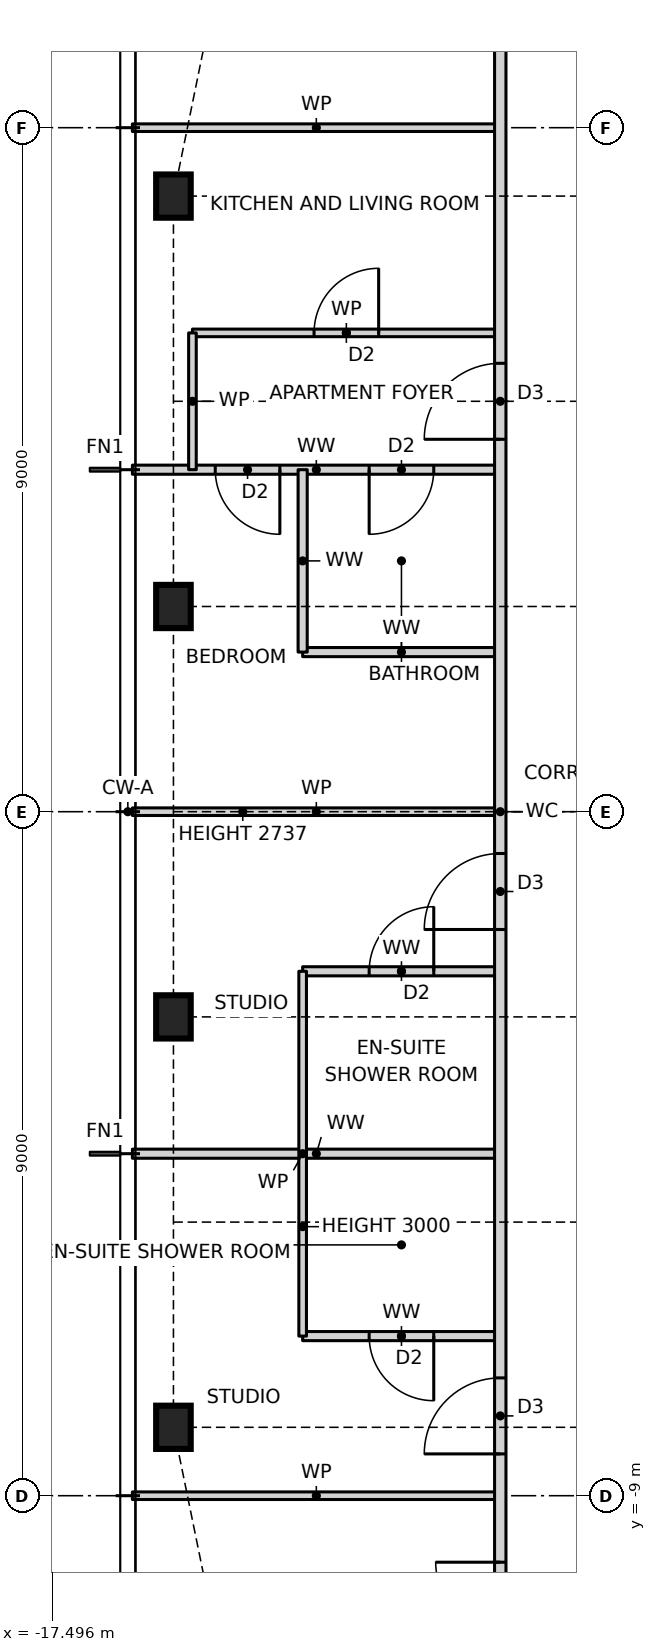
"""IFC4 building model, lengths in metres.
Left out: names, types, materials, properties, quantities, classifications, styles, units other than length and angle.
Written with IfcOpenShell. Run it as: python <this file> out.ifc"""

import sys

from ifc_helpers import new_model, si_unit, direction, frame, frame_2d, origin, origin_2d, place, context, subcontext, project, spatial, rectangle, i_section, extrude, element, fill, save


model = new_model("IFC4")
c1 = context("Model", 3, precision=1e-05, world=origin(), true_north=direction((0.0, 1.0)))
c2 = subcontext(c1, "Body", "Model", "MODEL_VIEW")
j1 = project(units=[si_unit("LENGTHUNIT", "METRE"), si_unit("PLANEANGLEUNIT", "RADIAN")], contexts=[c1])
p1 = place(None, origin())
s1 = spatial("IfcSite", under=j1, at=p1, CompositionType="ELEMENT")
p2 = place(p1, origin())
s2 = spatial("IfcBuilding", under=s1, at=p2, CompositionType="ELEMENT")
p3 = place(p2, frame((0.0, 0.0, 218.5)))
s3 = spatial("IfcBuildingStorey", under=s2, at=p3, CompositionType="ELEMENT", Elevation=218.5)
for number, where, z_axis, x_axis in (
    (1, (-15.9, 8.1, 0.0), (0.0, 0.0, 1.0), (1.0, 0.0, 0.0)),
    (2, (-15.9, 2.7, 0.0), (0.0, 0.0, 1.0), (1.0, 0.0, 0.0)),
    (3, (-15.9, -2.7, 0.0), (0.0, 0.0, 1.0), (1.0, 0.0, 0.0)),
    (4, (-15.9, -8.1, 0.0), (0.0, 0.0, 1.0), (1.0, 0.0, 0.0)),
):
    element("IfcColumn", number, at=place(p3, frame(where, z_axis=z_axis, x_axis=x_axis)), inside=s3, PredefinedType="COLUMN", context=c2, shape_type="SweptSolid", body=[
        extrude(i_section(OverallWidth=0.455, OverallDepth=0.569, WebThickness=0.078, FlangeThickness=0.125, at=origin_2d()), origin(), (0.0, 0.0, 1.0), 3.5),
    ])
p4 = place(p3, frame((-16.44, -9.0, 0.0), z_axis=(0.0, 0.0, 1.0), x_axis=(1.0, 0.0, 0.0)))
e5 = element("IfcWall", 5, at=p4, inside=s3, PredefinedType="PARTITIONING", context=c2, shape_type="SweptSolid", body=[
    extrude(rectangle(XDim=4.84, YDim=0.1, at=frame_2d((2.42, 0.0))), origin(), (0.0, 0.0, 1.0), 3.27),
])
p5 = place(p3, frame((-14.2, -6.9, 0.0), z_axis=(0.0, 0.0, 1.0), x_axis=(1.0, 0.0, 0.0)))
e6 = element("IfcWall", 6, at=p5, inside=s3, PredefinedType="PARTITIONING", context=c2, shape_type="SweptSolid", body=[
    extrude(rectangle(XDim=2.6, YDim=0.12, at=frame_2d((1.3, 0.0))), origin(), (0.0, 0.0, 1.0), 3.27),
])
p6 = place(p5, frame((0.875, 0.0, 0.0)))
e7 = element("IfcOpeningElement", 7, at=p6, cuts=e6, PredefinedType="OPENING", context=c2, shape_type="SweptSolid", body=[
    extrude(rectangle(XDim=0.85, YDim=2.1, at=frame_2d((0.425, 1.05))), frame((0.0, 0.07, 0.0), z_axis=(0.0, -1.0, 0.0), x_axis=(1.0, 0.0, 0.0)), (0.0, 0.0, 1.0), 0.14),
])
p7 = place(p3, frame((-16.44, -4.5, 0.0), z_axis=(0.0, 0.0, 1.0), x_axis=(1.0, 0.0, 0.0)))
e8 = element("IfcWall", 8, at=p7, inside=s3, PredefinedType="PARTITIONING", context=c2, shape_type="SweptSolid", body=[
    extrude(rectangle(XDim=4.84, YDim=0.12, at=frame_2d((2.42, 0.0))), origin(), (0.0, 0.0, 1.0), 3.27),
])
p8 = place(p3, frame((-14.2, -2.1, 0.0), z_axis=(0.0, 0.0, 1.0), x_axis=(1.0, 0.0, 0.0)))
e9 = element("IfcWall", 9, at=p8, inside=s3, PredefinedType="PARTITIONING", context=c2, shape_type="SweptSolid", body=[
    extrude(rectangle(XDim=2.6, YDim=0.12, at=frame_2d((1.3, 0.0))), origin(), (0.0, 0.0, 1.0), 3.27),
])
p9 = place(p8, frame((0.875, 0.0, 0.0)))
e10 = element("IfcOpeningElement", 10, at=p9, cuts=e9, PredefinedType="OPENING", context=c2, shape_type="SweptSolid", body=[
    extrude(rectangle(XDim=0.85, YDim=2.1, at=frame_2d((0.425, 1.05))), frame((0.0, 0.07, 0.0), z_axis=(0.0, -1.0, 0.0), x_axis=(1.0, 0.0, 0.0)), (0.0, 0.0, 1.0), 0.14),
])
p10 = place(p3, frame((-16.44, 0.0, 0.0), z_axis=(0.0, 0.0, 1.0), x_axis=(1.0, 0.0, 0.0)))
e11 = element("IfcWall", 11, at=p10, inside=s3, PredefinedType="PARTITIONING", context=c2, shape_type="SweptSolid", body=[
    extrude(rectangle(XDim=4.84, YDim=0.1, at=frame_2d((2.42, 0.0))), origin(), (0.0, 0.0, 1.0), 2.737),
])
p11 = place(p3, frame((-14.2, 2.1, 0.0), z_axis=(0.0, 0.0, 1.0), x_axis=(1.0, 0.0, 0.0)))
e12 = element("IfcWall", 12, at=p11, inside=s3, PredefinedType="PARTITIONING", context=c2, shape_type="SweptSolid", body=[
    extrude(rectangle(XDim=2.6, YDim=0.12, at=frame_2d((1.3, 0.0))), origin(), (0.0, 0.0, 1.0), 3.27),
])
p12 = place(p3, frame((-16.44, 4.5, 0.0), z_axis=(0.0, 0.0, 1.0), x_axis=(1.0, 0.0, 0.0)))
e13 = element("IfcWall", 13, at=p12, inside=s3, PredefinedType="PARTITIONING", context=c2, shape_type="SweptSolid", body=[
    extrude(rectangle(XDim=4.84, YDim=0.12, at=frame_2d((2.42, 0.0))), origin(), (0.0, 0.0, 1.0), 3.27),
])
p13 = place(p12, frame((1.09, 0.0, 0.0)))
e14 = element("IfcOpeningElement", 14, at=p13, cuts=e13, PredefinedType="OPENING", context=c2, shape_type="SweptSolid", body=[
    extrude(rectangle(XDim=0.85, YDim=2.1, at=frame_2d((0.425, 1.05))), frame((0.0, 0.07, 0.0), z_axis=(0.0, -1.0, 0.0), x_axis=(1.0, 0.0, 0.0)), (0.0, 0.0, 1.0), 0.14),
])
p14 = place(p12, frame((3.115, 0.0, 0.0)))
e15 = element("IfcOpeningElement", 15, at=p14, cuts=e13, PredefinedType="OPENING", context=c2, shape_type="SweptSolid", body=[
    extrude(rectangle(XDim=0.85, YDim=2.1, at=frame_2d((0.425, 1.05))), frame((0.0, 0.07, 0.0), z_axis=(0.0, -1.0, 0.0), x_axis=(1.0, 0.0, 0.0)), (0.0, 0.0, 1.0), 0.14),
])
p15 = place(p3, frame((-15.65, 6.3, 0.0), z_axis=(0.0, 0.0, 1.0), x_axis=(1.0, 0.0, 0.0)))
e16 = element("IfcWall", 16, at=p15, inside=s3, PredefinedType="PARTITIONING", context=c2, shape_type="SweptSolid", body=[
    extrude(rectangle(XDim=4.05, YDim=0.1, at=frame_2d((2.025, 0.0))), origin(), (0.0, 0.0, 1.0), 3.27),
])
p16 = place(p15, frame((1.6, 0.0, 0.0)))
e17 = element("IfcOpeningElement", 17, at=p16, cuts=e16, PredefinedType="OPENING", context=c2, shape_type="SweptSolid", body=[
    extrude(rectangle(XDim=0.85, YDim=2.1, at=frame_2d((0.425, 1.05))), frame((0.0, 0.06, 0.0), z_axis=(0.0, -1.0, 0.0), x_axis=(1.0, 0.0, 0.0)), (0.0, 0.0, 1.0), 0.12),
])
p17 = place(p3, frame((-16.44, 9.0, 0.0), z_axis=(0.0, 0.0, 1.0), x_axis=(1.0, 0.0, 0.0)))
e18 = element("IfcWall", 18, at=p17, inside=s3, PredefinedType="PARTITIONING", context=c2, shape_type="SweptSolid", body=[
    extrude(rectangle(XDim=4.84, YDim=0.1, at=frame_2d((2.42, 0.0))), origin(), (0.0, 0.0, 1.0), 3.27),
])
p18 = place(p3, frame((-11.6, -11.6, 0.0), z_axis=(0.0, 0.0, 1.0), x_axis=(0.0, 1.0, 0.0)))
e19 = element("IfcWall", 19, at=p18, inside=s3, PredefinedType="PARTITIONING", context=c2, shape_type="SweptSolid", body=[
    extrude(rectangle(XDim=23.2, YDim=0.15, at=frame_2d((11.6, 0.0))), origin(), (0.0, 0.0, 1.0), 3.27),
])
p19 = place(p18, frame((16.5, 0.0, 0.0)))
e20 = element("IfcOpeningElement", 20, at=p19, cuts=e19, PredefinedType="OPENING", context=c2, shape_type="SweptSolid", body=[
    extrude(rectangle(XDim=1.0, YDim=2.1, at=frame_2d((0.5, 1.05))), frame((0.0, 0.085, 0.0), z_axis=(0.0, -1.0, 0.0), x_axis=(1.0, 0.0, 0.0)), (0.0, 0.0, 1.0), 0.17),
])
p20 = place(p18, frame((10.05, 0.0, 0.0)))
e21 = element("IfcOpeningElement", 21, at=p20, cuts=e19, PredefinedType="OPENING", context=c2, shape_type="SweptSolid", body=[
    extrude(rectangle(XDim=1.0, YDim=2.1, at=frame_2d((0.5, 1.05))), frame((0.0, 0.085, 0.0), z_axis=(0.0, -1.0, 0.0), x_axis=(1.0, 0.0, 0.0)), (0.0, 0.0, 1.0), 0.17),
])
p21 = place(p18, frame((3.15, 0.0, 0.0)))
e22 = element("IfcOpeningElement", 22, at=p21, cuts=e19, PredefinedType="OPENING", context=c2, shape_type="SweptSolid", body=[
    extrude(rectangle(XDim=1.0, YDim=2.1, at=frame_2d((0.5, 1.05))), frame((0.0, 0.085, 0.0), z_axis=(0.0, -1.0, 0.0), x_axis=(1.0, 0.0, 0.0)), (0.0, 0.0, 1.0), 0.17),
])
p22 = place(p18, frame((0.875, 0.0, 0.0)))
e23 = element("IfcOpeningElement", 23, at=p22, cuts=e19, PredefinedType="OPENING", context=c2, shape_type="SweptSolid", body=[
    extrude(rectangle(XDim=0.85, YDim=2.1, at=frame_2d((0.425, 1.05))), frame((0.0, 0.085, 0.0), z_axis=(0.0, -1.0, 0.0), x_axis=(1.0, 0.0, 0.0)), (0.0, 0.0, 1.0), 0.17),
])
p23 = place(p3, frame((-14.2, -6.9, 0.0), z_axis=(0.0, 0.0, 1.0), x_axis=(0.0, 1.0, 0.0)))
e24 = element("IfcWall", 24, at=p23, inside=s3, PredefinedType="PARTITIONING", context=c2, shape_type="SweptSolid", body=[
    extrude(rectangle(XDim=4.8, YDim=0.1, at=frame_2d((2.4, 0.0))), origin(), (0.0, 0.0, 1.0), 3.0),
])
p24 = place(p3, frame((-14.2, 2.1, 0.0), z_axis=(0.0, 0.0, 1.0), x_axis=(0.0, 1.0, 0.0)))
e25 = element("IfcWall", 25, at=p24, inside=s3, PredefinedType="PARTITIONING", context=c2, shape_type="SweptSolid", body=[
    extrude(rectangle(XDim=2.4, YDim=0.12, at=frame_2d((1.2, 0.0))), origin(), (0.0, 0.0, 1.0), 3.27),
])
p25 = place(p3, frame((-15.65, 4.5, 0.0), z_axis=(0.0, 0.0, 1.0), x_axis=(0.0, 1.0, 0.0)))
e26 = element("IfcWall", 26, at=p25, inside=s3, PredefinedType="PARTITIONING", context=c2, shape_type="SweptSolid", body=[
    extrude(rectangle(XDim=1.8, YDim=0.1, at=frame_2d((0.9, 0.0))), origin(), (0.0, 0.0, 1.0), 3.27),
])
p26 = place(p19, origin())
e27 = element("IfcDoor", 27, at=p26, inside=s3, OperationType="SINGLE_SWING_LEFT", PredefinedType="DOOR", context=c2, shape_type="SweptSolid", body=[
    extrude(rectangle(XDim=1.0, YDim=2.1, at=frame_2d((0.5, 1.05))), frame((0.0, 0.025, 0.0), z_axis=(0.0, -1.0, 0.0), x_axis=(1.0, 0.0, 0.0)), (0.0, 0.0, 1.0), 0.05),
])
fill(e20, e27)
p27 = place(p16, origin())
e28 = element("IfcDoor", 28, at=p27, inside=s3, OperationType="SINGLE_SWING_RIGHT", PredefinedType="DOOR", context=c2, shape_type="SweptSolid", body=[
    extrude(rectangle(XDim=0.85, YDim=2.1, at=frame_2d((0.425, 1.05))), frame((0.0, 0.025, 0.0), z_axis=(0.0, -1.0, 0.0), x_axis=(1.0, 0.0, 0.0)), (0.0, 0.0, 1.0), 0.05),
])
fill(e17, e28)
p28 = place(p13, frame((0.85, 0.0, 0.0), z_axis=(0.0, 0.0, 1.0), x_axis=(-1.0, 0.0, 0.0)))
e29 = element("IfcDoor", 29, at=p28, inside=s3, OperationType="SINGLE_SWING_LEFT", PredefinedType="DOOR", context=c2, shape_type="SweptSolid", body=[
    extrude(rectangle(XDim=0.85, YDim=2.1, at=frame_2d((0.425, 1.05))), frame((0.0, 0.025, 0.0), z_axis=(0.0, -1.0, 0.0), x_axis=(1.0, 0.0, 0.0)), (0.0, 0.0, 1.0), 0.05),
])
fill(e14, e29)
p29 = place(p14, frame((0.85, 0.0, 0.0), z_axis=(0.0, 0.0, 1.0), x_axis=(-1.0, 0.0, 0.0)))
e30 = element("IfcDoor", 30, at=p29, inside=s3, OperationType="SINGLE_SWING_RIGHT", PredefinedType="DOOR", context=c2, shape_type="SweptSolid", body=[
    extrude(rectangle(XDim=0.85, YDim=2.1, at=frame_2d((0.425, 1.05))), frame((0.0, 0.025, 0.0), z_axis=(0.0, -1.0, 0.0), x_axis=(1.0, 0.0, 0.0)), (0.0, 0.0, 1.0), 0.05),
])
fill(e15, e30)
p30 = place(p20, origin())
e31 = element("IfcDoor", 31, at=p30, inside=s3, OperationType="SINGLE_SWING_LEFT", PredefinedType="DOOR", context=c2, shape_type="SweptSolid", body=[
    extrude(rectangle(XDim=1.0, YDim=2.1, at=frame_2d((0.5, 1.05))), frame((0.0, 0.025, 0.0), z_axis=(0.0, -1.0, 0.0), x_axis=(1.0, 0.0, 0.0)), (0.0, 0.0, 1.0), 0.05),
])
fill(e21, e31)
p31 = place(p9, origin())
e32 = element("IfcDoor", 32, at=p31, inside=s3, OperationType="SINGLE_SWING_RIGHT", PredefinedType="DOOR", context=c2, shape_type="SweptSolid", body=[
    extrude(rectangle(XDim=0.85, YDim=2.1, at=frame_2d((0.425, 1.05))), frame((0.0, 0.025, 0.0), z_axis=(0.0, -1.0, 0.0), x_axis=(1.0, 0.0, 0.0)), (0.0, 0.0, 1.0), 0.05),
])
fill(e10, e32)
p32 = place(p21, origin())
e33 = element("IfcDoor", 33, at=p32, inside=s3, OperationType="SINGLE_SWING_LEFT", PredefinedType="DOOR", context=c2, shape_type="SweptSolid", body=[
    extrude(rectangle(XDim=1.0, YDim=2.1, at=frame_2d((0.5, 1.05))), frame((0.0, 0.025, 0.0), z_axis=(0.0, -1.0, 0.0), x_axis=(1.0, 0.0, 0.0)), (0.0, 0.0, 1.0), 0.05),
])
fill(e22, e33)
p33 = place(p6, frame((0.85, 0.0, 0.0), z_axis=(0.0, 0.0, 1.0), x_axis=(-1.0, 0.0, 0.0)))
e34 = element("IfcDoor", 34, at=p33, inside=s3, OperationType="SINGLE_SWING_LEFT", PredefinedType="DOOR", context=c2, shape_type="SweptSolid", body=[
    extrude(rectangle(XDim=0.85, YDim=2.1, at=frame_2d((0.425, 1.05))), frame((0.0, 0.025, 0.0), z_axis=(0.0, -1.0, 0.0), x_axis=(1.0, 0.0, 0.0)), (0.0, 0.0, 1.0), 0.05),
])
fill(e7, e34)
p34 = place(p22, origin())
e35 = element("IfcDoor", 35, at=p34, inside=s3, OperationType="SINGLE_SWING_RIGHT", PredefinedType="DOOR", context=c2, shape_type="SweptSolid", body=[
    extrude(rectangle(XDim=0.85, YDim=2.1, at=frame_2d((0.425, 1.05))), frame((0.0, 0.025, 0.0), z_axis=(0.0, -1.0, 0.0), x_axis=(1.0, 0.0, 0.0)), (0.0, 0.0, 1.0), 0.05),
])
fill(e23, e35)
save(model, sys.argv[1])
